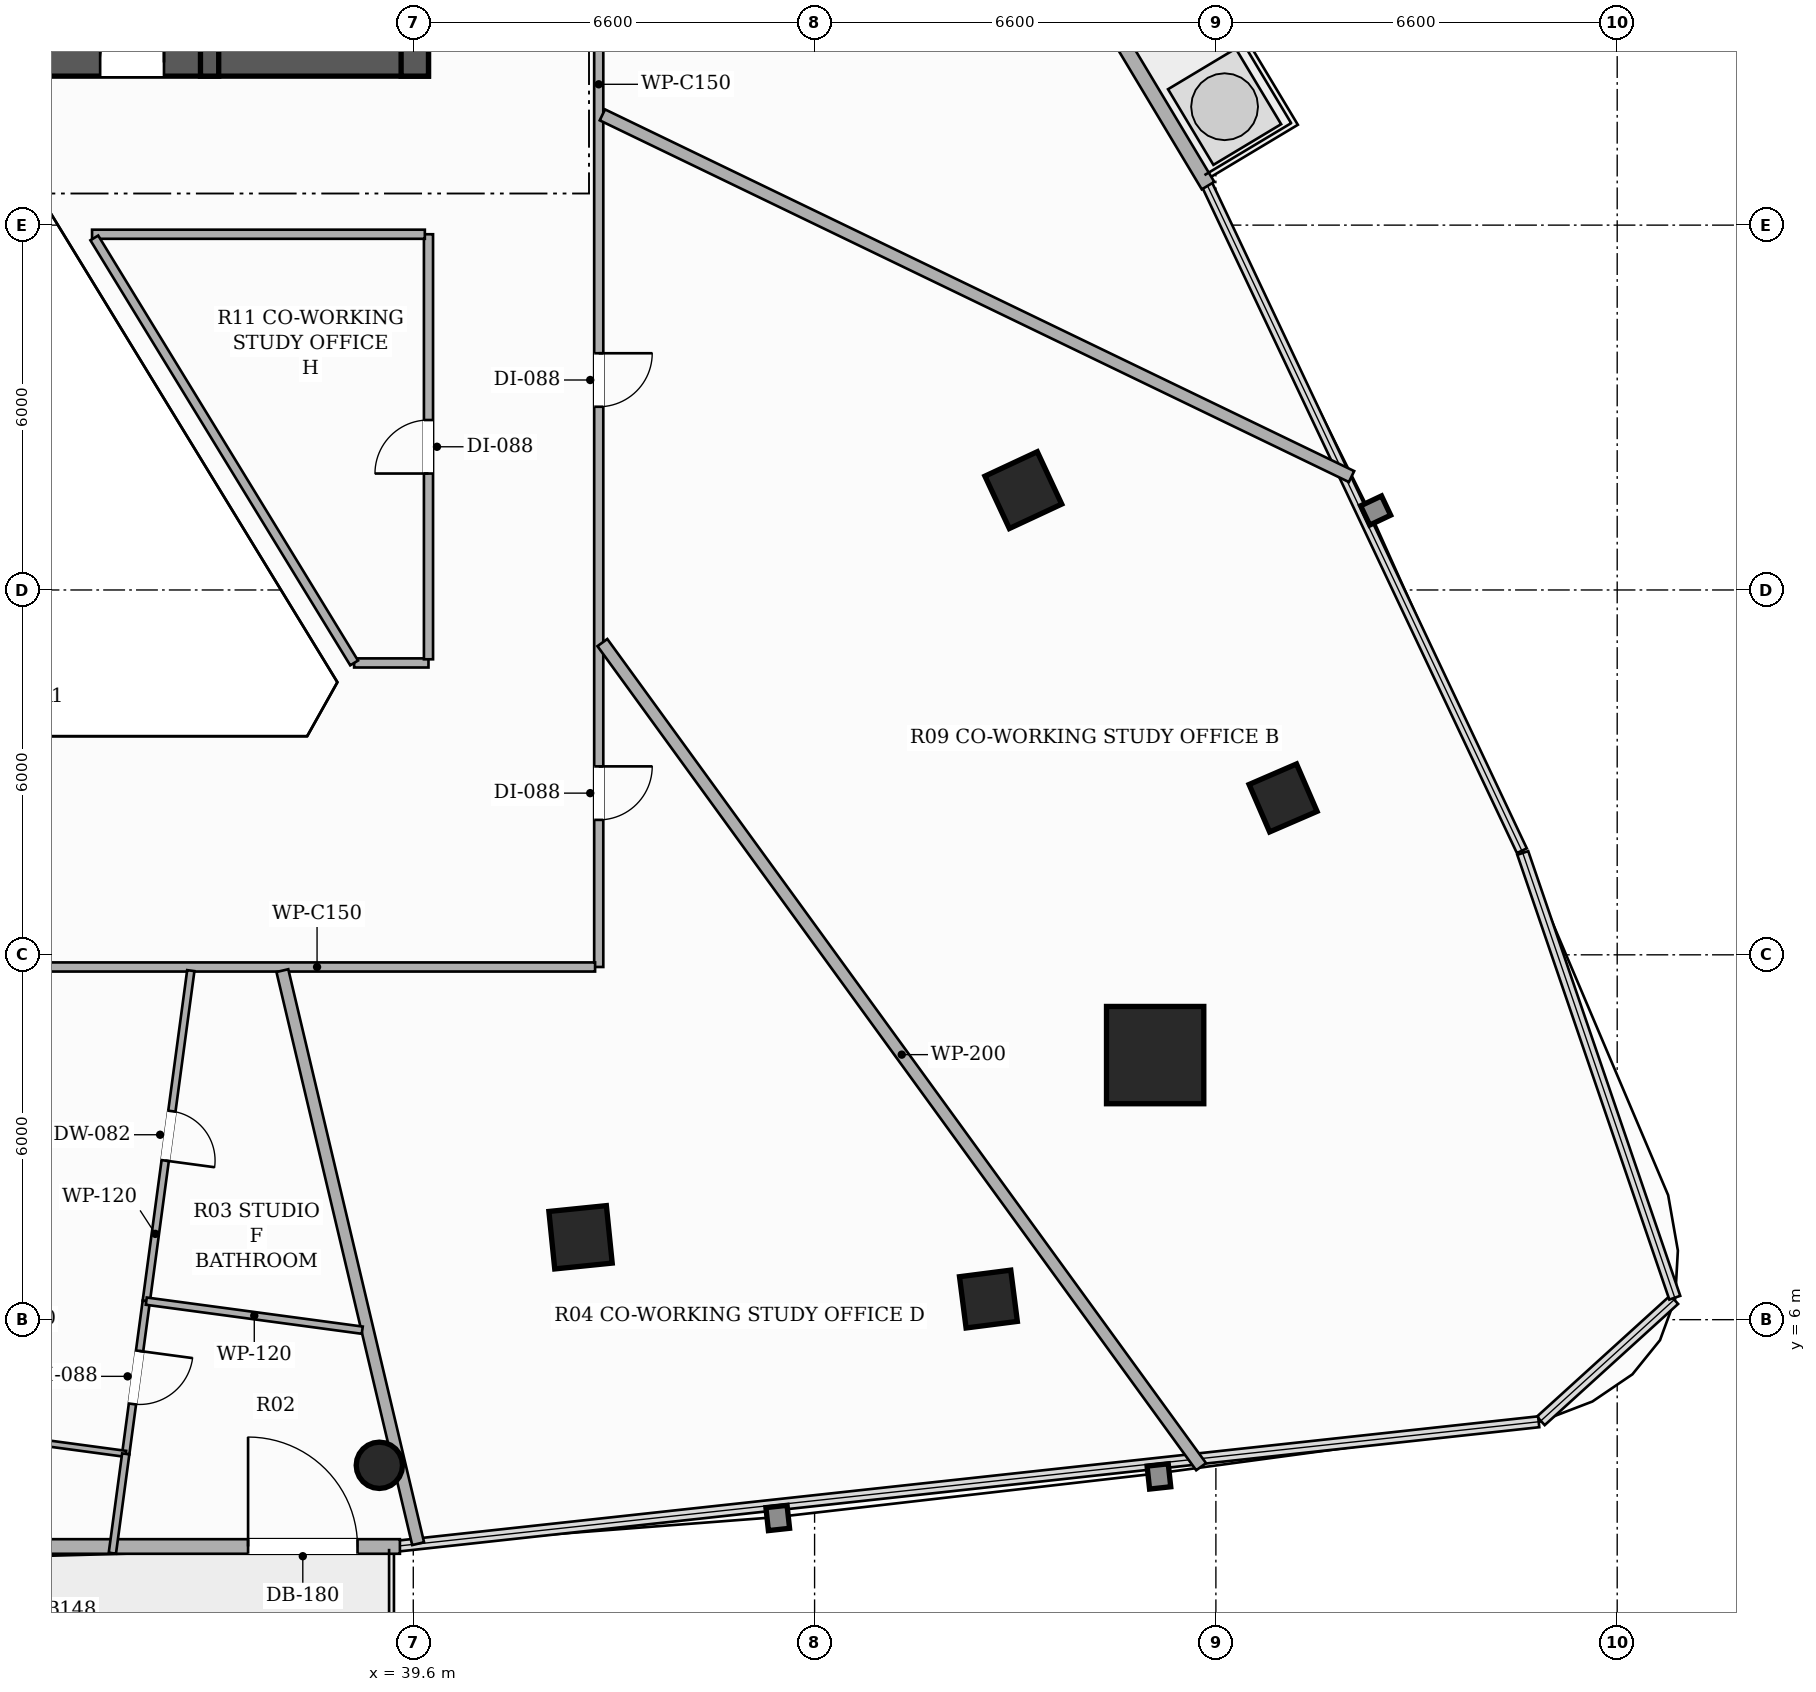
"""IFC4 building model, lengths in metres.
Left out: names, types, materials, properties, quantities, classifications, styles, units other than length and angle.
Written with IfcOpenShell. Run it as: python <this file> out.ifc"""

import sys

from ifc_helpers import new_model, si_unit, direction, frame, frame_2d, origin, origin_2d, place, context, subcontext, project, spatial, rectangle, hollow_rectangle, hollow_circle, extrude, element, fill, save


model = new_model("IFC4")
c1 = context("Model", 3, precision=1e-05, world=origin(), true_north=direction((0.0, 1.0)))
c2 = subcontext(c1, "Body", "Model", "MODEL_VIEW")
j1 = project(units=[si_unit("LENGTHUNIT", "METRE"), si_unit("PLANEANGLEUNIT", "RADIAN")], contexts=[c1])
p1 = place(None, origin())
s1 = spatial("IfcSite", under=j1, at=p1, CompositionType="ELEMENT")
p2 = place(p1, origin())
s2 = spatial("IfcBuilding", under=s1, at=p2, CompositionType="ELEMENT")
p3 = place(p2, frame((0.0, 0.0, 84.05)))
s3 = spatial("IfcBuildingStorey", under=s2, at=p3, CompositionType="ELEMENT", Elevation=84.05)
p4 = place(p3, frame((26.15, 26.675, 0.0), z_axis=(0.0, 0.0, 1.0), x_axis=(1.0, 0.0, 0.0)))
e1 = element("IfcWall", 1, at=p4, inside=s3, PredefinedType="SHEAR", context=c2, shape_type="SweptSolid", body=[
    extrude(rectangle(XDim=13.7, YDim=0.45, at=frame_2d((6.85, 0.0))), origin(), (0.0, 0.0, 1.0), 3.3),
])
p5 = place(p4, frame((4.35, 0.0, 0.0)))
e2 = element("IfcOpeningElement", 2, at=p5, cuts=e1, PredefinedType="OPENING", context=c2, shape_type="SweptSolid", body=[
    extrude(rectangle(XDim=1.05, YDim=2.15, at=frame_2d((0.525, 1.075))), frame((0.0, 0.235, 0.0), z_axis=(0.0, -1.0, 0.0), x_axis=(1.0, 0.0, 0.0)), (0.0, 0.0, 1.0), 0.47),
])
p6 = place(p4, frame((8.3, 0.0, 0.0)))
e3 = element("IfcOpeningElement", 3, at=p6, cuts=e1, PredefinedType="OPENING", context=c2, shape_type="SweptSolid", body=[
    extrude(rectangle(XDim=1.05, YDim=2.15, at=frame_2d((0.525, 1.075))), frame((0.0, 0.235, 0.0), z_axis=(0.0, -1.0, 0.0), x_axis=(1.0, 0.0, 0.0)), (0.0, 0.0, 1.0), 0.47),
])
p7 = place(p3, frame((39.625, 26.45, 0.0), z_axis=(0.0, 0.0, 1.0), x_axis=(0.0, 1.0, 0.0)))
e4 = element("IfcWall", 4, at=p7, inside=s3, PredefinedType="SHEAR", context=c2, shape_type="SweptSolid", body=[
    extrude(rectangle(XDim=7.7, YDim=0.45, at=frame_2d((3.85, 0.0))), origin(), (0.0, 0.0, 1.0), 3.3),
])
p8 = place(p3, frame((36.25, 26.45, 0.0), z_axis=(0.0, 0.0, 1.0), x_axis=(0.0, 1.0, 0.0)))
e5 = element("IfcWall", 5, at=p8, inside=s3, PredefinedType="SHEAR", context=c2, shape_type="SweptSolid", body=[
    extrude(rectangle(XDim=8.2, YDim=0.3, at=frame_2d((4.1, 0.0))), origin(), (0.0, 0.0, 1.0), 3.3),
])
p9 = place(p8, frame((0.6, 0.0, 0.0)))
e6 = element("IfcOpeningElement", 6, at=p9, cuts=e5, PredefinedType="OPENING", context=c2, shape_type="SweptSolid", body=[
    extrude(rectangle(XDim=1.05, YDim=2.15, at=frame_2d((0.525, 1.075))), frame((0.0, 0.16, 0.0), z_axis=(0.0, -1.0, 0.0), x_axis=(1.0, 0.0, 0.0)), (0.0, 0.0, 1.0), 0.32),
])
p10 = place(p3, frame((51.801, 10.351, 0.0), z_axis=(0.0, 0.0, 1.0), x_axis=(1.0, 0.0, 0.0)))
e7 = element("IfcColumn", 7, at=p10, inside=s3, PredefinedType="COLUMN", context=c2, shape_type="SweptSolid", body=[
    extrude(hollow_rectangle(XDim=1.6, YDim=1.6, WallThickness=0.05, at=origin_2d()), origin(), (0.0, 0.0, 1.0), 3.3),
])
for number, where, z_axis, x_axis in (
    (8, (42.351, 7.355, 0.0), (0.0, 0.0, 1.0), (0.995, 0.101, 0.0)),
    (9, (49.633, 19.642, 0.0), (0.0, 0.0, 1.0), (-0.423, 0.906, 0.0)),
):
    element("IfcColumn", number, at=place(p3, frame(where, z_axis=z_axis, x_axis=x_axis)), inside=s3, PredefinedType="COLUMN", context=c2, shape_type="SweptSolid", body=[
        extrude(hollow_rectangle(XDim=0.95, YDim=0.95, WallThickness=0.032, at=origin_2d()), origin(), (0.0, 0.0, 1.0), 3.3),
    ])
for number, where, z_axis, x_axis in (
    (10, (49.059, 6.339, 0.0), (0.0, 0.0, 1.0), (0.992, 0.127, 0.0)),
    (11, (53.905, 14.58, 0.0), (0.0, 0.0, 1.0), (-0.397, 0.918, 0.0)),
):
    element("IfcColumn", number, at=place(p3, frame(where, z_axis=z_axis, x_axis=x_axis)), inside=s3, PredefinedType="COLUMN", context=c2, shape_type="SweptSolid", body=[
        extrude(hollow_rectangle(XDim=0.85, YDim=0.85, WallThickness=0.028, at=origin_2d()), origin(), (0.0, 0.0, 1.0), 3.3),
    ])
p11 = place(p3, frame((39.042, 3.605, 0.0), z_axis=(0.0, 0.0, 1.0), x_axis=(1.0, 0.0, 0.0)))
e12 = element("IfcColumn", 12, at=p11, inside=s3, PredefinedType="COLUMN", context=c2, shape_type="SweptSolid", body=[
    extrude(hollow_circle(Radius=0.381, WallThickness=0.022, at=origin_2d()), origin(), (0.0, 0.0, 1.0), 3.3),
])
p12 = place(p3, frame((26.62, 2.27, 0.0), z_axis=(0.0, 0.0, 1.0), x_axis=(1.0, 0.0, 0.0)))
e13 = element("IfcWall", 13, at=p12, inside=s3, PredefinedType="SOLIDWALL", context=c2, shape_type="SweptSolid", body=[
    extrude(rectangle(XDim=12.76, YDim=0.24, at=frame_2d((6.38, 0.0))), origin(), (0.0, 0.0, 1.0), 2.624),
])
p13 = place(p12, frame((10.263, 0.0, 0.0)))
e14 = element("IfcOpeningElement", 14, at=p13, cuts=e13, PredefinedType="OPENING", context=c2, shape_type="SweptSolid", body=[
    extrude(rectangle(XDim=1.8, YDim=2.2, at=frame_2d((0.9, 1.1))), frame((0.0, 0.13, 0.0), z_axis=(0.0, -1.0, 0.0), x_axis=(1.0, 0.0, 0.0)), (0.0, 0.0, 1.0), 0.26),
])
p14 = place(p3, frame((52.671, 24.65, 0.0), z_axis=(0.0, 0.0, 1.0), x_axis=(-0.514338730901, 0.857587120877, 0.0)))
e15 = element("IfcWall", 15, at=p14, inside=s3, PredefinedType="SOLIDWALL", context=c2, shape_type="SweptSolid", body=[
    extrude(rectangle(XDim=12.348, YDim=0.24, at=frame_2d((6.174, 0.0))), origin(), (0.0, 0.0, 1.0), 2.624),
])
p15 = place(p14, frame((9.85, 0.0, 0.0)))
e16 = element("IfcOpeningElement", 16, at=p15, cuts=e15, PredefinedType="OPENING", context=c2, shape_type="SweptSolid", body=[
    extrude(rectangle(XDim=1.8, YDim=2.2, at=frame_2d((0.9, 1.1))), frame((0.0, 0.13, 0.0), z_axis=(0.0, -1.0, 0.0), x_axis=(1.0, 0.0, 0.0)), (0.0, 0.0, 1.0), 0.26),
])
p16 = place(p3, frame((42.65, 36.84, 0.0), z_axis=(0.0, 0.0, 1.0), x_axis=(0.0, -1.0, 0.0)))
e17 = element("IfcWall", 17, at=p16, inside=s3, PredefinedType="PARTITIONING", context=c2, shape_type="SweptSolid", body=[
    extrude(rectangle(XDim=25.04, YDim=0.15, at=frame_2d((12.52, 0.0))), origin(), (0.0, 0.0, 1.0), 2.413),
])
p17 = place(p16, frame((14.947, 0.0, 0.0)))
e18 = element("IfcOpeningElement", 18, at=p17, cuts=e17, PredefinedType="OPENING", context=c2, shape_type="SweptSolid", body=[
    extrude(rectangle(XDim=0.88, YDim=2.1, at=frame_2d((0.44, 1.05))), frame((0.0, 0.085, 0.0), z_axis=(0.0, -1.0, 0.0), x_axis=(1.0, 0.0, 0.0)), (0.0, 0.0, 1.0), 0.17),
])
p18 = place(p16, frame((21.741, 0.0, 0.0)))
e19 = element("IfcOpeningElement", 19, at=p18, cuts=e17, PredefinedType="OPENING", context=c2, shape_type="SweptSolid", body=[
    extrude(rectangle(XDim=0.88, YDim=2.1, at=frame_2d((0.44, 1.05))), frame((0.0, 0.085, 0.0), z_axis=(0.0, -1.0, 0.0), x_axis=(1.0, 0.0, 0.0)), (0.0, 0.0, 1.0), 0.17),
])
p19 = place(p16, frame((5.221, 0.0, 0.0)))
e20 = element("IfcOpeningElement", 20, at=p19, cuts=e17, PredefinedType="OPENING", context=c2, shape_type="SweptSolid", body=[
    extrude(rectangle(XDim=0.88, YDim=2.1, at=frame_2d((0.44, 1.05))), frame((0.0, 0.085, 0.0), z_axis=(0.0, -1.0, 0.0), x_axis=(1.0, 0.0, 0.0)), (0.0, 0.0, 1.0), 0.17),
])
p20 = place(p3, frame((42.59, 11.8, 0.0), z_axis=(0.0, 0.0, 1.0), x_axis=(-1.0, 0.0, 0.0)))
e21 = element("IfcWall", 21, at=p20, inside=s3, PredefinedType="PARTITIONING", context=c2, shape_type="SweptSolid", body=[
    extrude(rectangle(XDim=19.24, YDim=0.15, at=frame_2d((9.62, 0.0))), origin(), (0.0, 0.0, 1.0), 2.669),
])
p21 = place(p20, frame((9.245, 0.0, 0.0)))
e22 = element("IfcOpeningElement", 22, at=p21, cuts=e21, PredefinedType="OPENING", context=c2, shape_type="SweptSolid", body=[
    extrude(rectangle(XDim=0.92, YDim=2.15, at=frame_2d((0.46, 1.075))), frame((0.0, 0.085, 0.0), z_axis=(0.0, -1.0, 0.0), x_axis=(1.0, 0.0, 0.0)), (0.0, 0.0, 1.0), 0.17),
])
p22 = place(p3, frame((38.627, 16.8, 0.0), z_axis=(0.0, 0.0, 1.0), x_axis=(1.0, 0.0, 0.0)))
e23 = element("IfcWall", 23, at=p22, inside=s3, PredefinedType="PARTITIONING", context=c2, shape_type="SweptSolid", body=[
    extrude(rectangle(XDim=1.223, YDim=0.15, at=frame_2d((0.612, 0.0))), origin(), (0.0, 0.0, 1.0), 3.06),
])
p23 = place(p3, frame((39.85, 16.86, 0.0), z_axis=(0.0, 0.0, 1.0), x_axis=(0.0, 1.0, 0.0)))
e24 = element("IfcWall", 24, at=p23, inside=s3, PredefinedType="PARTITIONING", context=c2, shape_type="SweptSolid", body=[
    extrude(rectangle(XDim=6.99, YDim=0.15, at=frame_2d((3.495, 0.0))), origin(), (0.0, 0.0, 1.0), 2.669),
])
p24 = place(p23, frame((3.055, 0.0, 0.0)))
e25 = element("IfcOpeningElement", 25, at=p24, cuts=e24, PredefinedType="OPENING", context=c2, shape_type="SweptSolid", body=[
    extrude(rectangle(XDim=0.88, YDim=2.1, at=frame_2d((0.44, 1.05))), frame((0.0, 0.085, 0.0), z_axis=(0.0, -1.0, 0.0), x_axis=(1.0, 0.0, 0.0)), (0.0, 0.0, 1.0), 0.17),
])
p25 = place(p3, frame((39.79, 23.85, 0.0), z_axis=(0.0, 0.0, 1.0), x_axis=(-1.0, 0.0, 0.0)))
e26 = element("IfcWall", 26, at=p25, inside=s3, PredefinedType="PARTITIONING", context=c2, shape_type="SweptSolid", body=[
    extrude(rectangle(XDim=5.473, YDim=0.15, at=frame_2d((2.737, 0.0))), origin(), (0.0, 0.0, 1.0), 2.669),
])
p26 = place(p3, frame((34.354, 23.79, 0.0), z_axis=(0.0, 0.0, 1.0), x_axis=(0.521564518198, -0.853211845533, 0.0)))
e27 = element("IfcWall", 27, at=p26, inside=s3, PredefinedType="PARTITIONING", context=c2, shape_type="SweptSolid", body=[
    extrude(rectangle(XDim=8.193, YDim=0.15, at=frame_2d((4.096, 0.0))), origin(), (0.0, 0.0, 1.0), 2.669),
])
p27 = place(p3, frame((52.557, 3.582, 0.0), z_axis=(0.0, 0.0, 1.0), x_axis=(-0.587789493476, 0.809013912958, 0.0)))
e28 = element("IfcWall", 28, at=p27, inside=s3, PredefinedType="PARTITIONING", context=c2, shape_type="SweptSolid", body=[
    extrude(rectangle(XDim=16.752, YDim=0.2, at=frame_2d((8.376, 0.0))), origin(), (0.0, 0.0, 1.0), 2.413),
])
p28 = place(p3, frame((42.71, 25.813, 0.0), z_axis=(0.0, 0.0, 1.0), x_axis=(0.900554286339, -0.434743576556, 0.0)))
e29 = element("IfcWall", 29, at=p28, inside=s3, PredefinedType="PARTITIONING", context=c2, shape_type="SweptSolid", body=[
    extrude(rectangle(XDim=13.682, YDim=0.2, at=frame_2d((6.841, 0.0))), origin(), (0.0, 0.0, 1.0), 2.413),
])
p29 = place(p3, frame((39.68, 2.316, 0.0), z_axis=(0.0, 0.0, 1.0), x_axis=(-0.230553694048, 0.973059604629, 0.0)))
e30 = element("IfcWall", 30, at=p29, inside=s3, PredefinedType="PARTITIONING", context=c2, shape_type="SweptSolid", body=[
    extrude(rectangle(XDim=9.685, YDim=0.2, at=frame_2d((4.843, 0.0))), origin(), (0.0, 0.0, 1.0), 2.413),
])
p30 = place(p3, frame((35.941, 11.74, 0.0), z_axis=(0.0, 0.0, 1.0), x_axis=(-0.133464146048, -0.991053642201, 0.0)))
e31 = element("IfcWall", 31, at=p30, inside=s3, PredefinedType="PARTITIONING", context=c2, shape_type="SweptSolid", body=[
    extrude(rectangle(XDim=5.484, YDim=0.12, at=frame_2d((2.742, 0.0))), origin(), (0.0, 0.0, 1.0), 2.669),
])
p31 = place(p30, frame((2.332, 0.0, 0.0)))
e32 = element("IfcOpeningElement", 32, at=p31, cuts=e31, PredefinedType="OPENING", context=c2, shape_type="SweptSolid", body=[
    extrude(rectangle(XDim=0.82, YDim=2.1, at=frame_2d((0.41, 1.05))), frame((0.0, 0.07, 0.0), z_axis=(0.0, -1.0, 0.0), x_axis=(1.0, 0.0, 0.0)), (0.0, 0.0, 1.0), 0.14),
])
p32 = place(p3, frame((35.209, 6.305, 0.0), z_axis=(0.0, 0.0, 1.0), x_axis=(-0.133311944021, -0.991074127188, 0.0)))
e33 = element("IfcWall", 33, at=p32, inside=s3, PredefinedType="PARTITIONING", context=c2, shape_type="SweptSolid", body=[
    extrude(rectangle(XDim=2.535, YDim=0.12, at=frame_2d((1.267, 0.0))), origin(), (0.0, 0.0, 1.0), 2.413),
])
p33 = place(p32, frame((0.827, 0.0, 0.0)))
e34 = element("IfcOpeningElement", 34, at=p33, cuts=e33, PredefinedType="OPENING", context=c2, shape_type="SweptSolid", body=[
    extrude(rectangle(XDim=0.88, YDim=2.1, at=frame_2d((0.44, 1.05))), frame((0.0, 0.07, 0.0), z_axis=(0.0, -1.0, 0.0), x_axis=(1.0, 0.0, 0.0)), (0.0, 0.0, 1.0), 0.14),
])
p34 = place(p3, frame((34.871, 3.793, 0.0), z_axis=(0.0, 0.0, 1.0), x_axis=(-0.991052148622, 0.133475236324, 0.0)))
e35 = element("IfcWall", 35, at=p34, inside=s3, PredefinedType="PARTITIONING", context=c2, shape_type="SweptSolid", body=[
    extrude(rectangle(XDim=8.242, YDim=0.1, at=frame_2d((4.121, 0.0))), origin(), (0.0, 0.0, 1.0), 2.413),
])
p35 = place(p34, frame((3.681, 0.0, 0.0)))
e36 = element("IfcOpeningElement", 36, at=p35, cuts=e35, PredefinedType="OPENING", context=c2, shape_type="SweptSolid", body=[
    extrude(rectangle(XDim=0.88, YDim=2.1, at=frame_2d((0.44, 1.05))), frame((0.0, 0.06, 0.0), z_axis=(0.0, -1.0, 0.0), x_axis=(1.0, 0.0, 0.0)), (0.0, 0.0, 1.0), 0.12),
])
p36 = place(p3, frame((38.761, 5.827, 0.0), z_axis=(0.0, 0.0, 1.0), x_axis=(-0.991065337555, 0.133377272042, 0.0)))
e37 = element("IfcWall", 37, at=p36, inside=s3, PredefinedType="PARTITIONING", context=c2, shape_type="SweptSolid", body=[
    extrude(rectangle(XDim=3.584, YDim=0.12, at=frame_2d((1.792, 0.0))), origin(), (0.0, 0.0, 1.0), 2.669),
])
p37 = place(p3, frame((34.651, 2.16, 0.0), z_axis=(0.0, 0.0, 1.0), x_axis=(0.133638685836, 0.991030121463, 0.0)))
e38 = element("IfcWall", 38, at=p37, inside=s3, PredefinedType="PARTITIONING", context=c2, shape_type="SweptSolid", body=[
    extrude(rectangle(XDim=1.648, YDim=0.12, at=frame_2d((0.824, 0.0))), origin(), (0.0, 0.0, 1.0), 3.06),
])
p38 = place(p13, origin())
e39 = element("IfcDoor", 39, at=p38, inside=s3, OperationType="SINGLE_SWING_LEFT", PredefinedType="DOOR", context=c2, shape_type="SweptSolid", body=[
    extrude(rectangle(XDim=1.8, YDim=2.2, at=frame_2d((0.9, 1.1))), frame((0.0, 0.025, 0.0), z_axis=(0.0, -1.0, 0.0), x_axis=(1.0, 0.0, 0.0)), (0.0, 0.0, 1.0), 0.05),
])
fill(e14, e39)
p39 = place(p6, origin())
e40 = element("IfcDoor", 40, at=p39, inside=s3, OperationType="SINGLE_SWING_RIGHT", PredefinedType="DOOR", context=c2, shape_type="SweptSolid", body=[
    extrude(rectangle(XDim=1.05, YDim=2.15, at=frame_2d((0.525, 1.075))), frame((0.0, 0.025, 0.0), z_axis=(0.0, -1.0, 0.0), x_axis=(1.0, 0.0, 0.0)), (0.0, 0.0, 1.0), 0.05),
])
fill(e3, e40)
p40 = place(p17, origin())
e41 = element("IfcDoor", 41, at=p40, inside=s3, OperationType="SINGLE_SWING_LEFT", PredefinedType="DOOR", context=c2, shape_type="SweptSolid", body=[
    extrude(rectangle(XDim=0.88, YDim=2.1, at=frame_2d((0.44, 1.05))), frame((0.0, 0.025, 0.0), z_axis=(0.0, -1.0, 0.0), x_axis=(1.0, 0.0, 0.0)), (0.0, 0.0, 1.0), 0.05),
])
fill(e18, e41)
p41 = place(p18, origin())
e42 = element("IfcDoor", 42, at=p41, inside=s3, OperationType="SINGLE_SWING_LEFT", PredefinedType="DOOR", context=c2, shape_type="SweptSolid", body=[
    extrude(rectangle(XDim=0.88, YDim=2.1, at=frame_2d((0.44, 1.05))), frame((0.0, 0.025, 0.0), z_axis=(0.0, -1.0, 0.0), x_axis=(1.0, 0.0, 0.0)), (0.0, 0.0, 1.0), 0.05),
])
fill(e19, e42)
p42 = place(p31, origin())
e43 = element("IfcDoor", 43, at=p42, inside=s3, OperationType="SINGLE_SWING_RIGHT", PredefinedType="DOOR", context=c2, shape_type="SweptSolid", body=[
    extrude(rectangle(XDim=0.82, YDim=2.1, at=frame_2d((0.41, 1.05))), frame((0.0, 0.025, 0.0), z_axis=(0.0, -1.0, 0.0), x_axis=(1.0, 0.0, 0.0)), (0.0, 0.0, 1.0), 0.05),
])
fill(e32, e43)
p43 = place(p33, origin())
e44 = element("IfcDoor", 44, at=p43, inside=s3, OperationType="SINGLE_SWING_LEFT", PredefinedType="DOOR", context=c2, shape_type="SweptSolid", body=[
    extrude(rectangle(XDim=0.88, YDim=2.1, at=frame_2d((0.44, 1.05))), frame((0.0, 0.025, 0.0), z_axis=(0.0, -1.0, 0.0), x_axis=(1.0, 0.0, 0.0)), (0.0, 0.0, 1.0), 0.05),
])
fill(e34, e44)
p44 = place(p24, origin())
e45 = element("IfcDoor", 45, at=p44, inside=s3, OperationType="SINGLE_SWING_LEFT", PredefinedType="DOOR", context=c2, shape_type="SweptSolid", body=[
    extrude(rectangle(XDim=0.88, YDim=2.1, at=frame_2d((0.44, 1.05))), frame((0.0, 0.025, 0.0), z_axis=(0.0, -1.0, 0.0), x_axis=(1.0, 0.0, 0.0)), (0.0, 0.0, 1.0), 0.05),
])
fill(e25, e45)
save(model, sys.argv[1])
